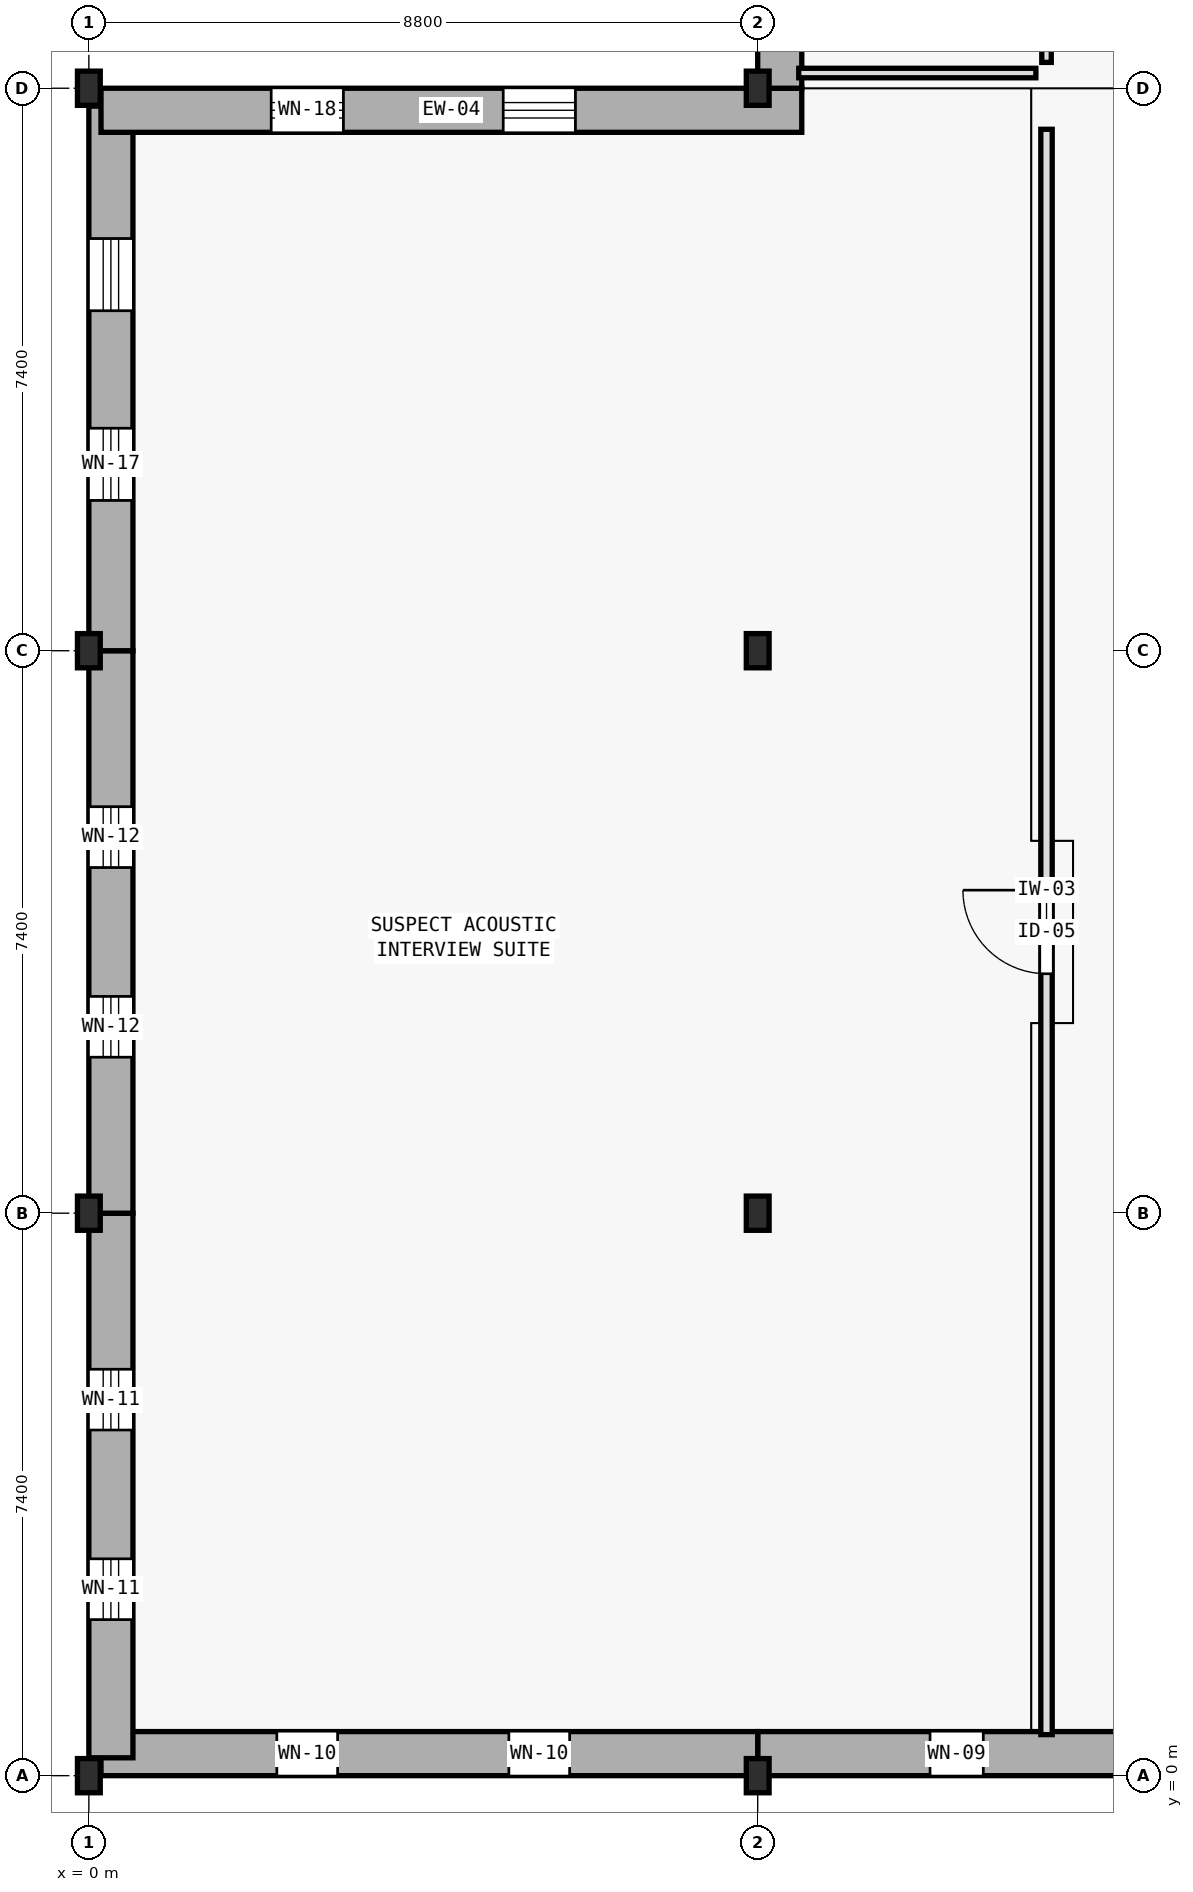
"""IFC4 building model, lengths in metres.
Left out: names, types, materials, properties, quantities, classifications, styles, units other than length and angle.
Written with IfcOpenShell. Run it as: python <this file> out.ifc"""

import sys

from ifc_helpers import new_model, si_unit, direction, frame, frame_2d, origin, origin_2d, place, context, subcontext, project, spatial, rectangle, i_section, extrude, element, fill, save


model = new_model("IFC4")
c1 = context("Model", 3, precision=1e-05, world=origin(), true_north=direction((0.0, 1.0)))
c2 = subcontext(c1, "Body", "Model", "MODEL_VIEW")
j1 = project(units=[si_unit("LENGTHUNIT", "METRE"), si_unit("PLANEANGLEUNIT", "RADIAN")], contexts=[c1])
p1 = place(None, origin())
s1 = spatial("IfcSite", under=j1, at=p1, CompositionType="ELEMENT")
p2 = place(p1, origin())
s2 = spatial("IfcBuilding", under=s1, at=p2, CompositionType="ELEMENT")
p3 = place(p2, frame((0.0, 0.0, 5.4)))
s3 = spatial("IfcBuildingStorey", under=s2, at=p3, CompositionType="ELEMENT", Elevation=5.4)
for number, where, z_axis, x_axis in (
    (1, (0.0, 0.0, 0.0), (0.0, 0.0, 1.0), (1.0, 0.0, 0.0)),
    (2, (0.0, 7.4, 0.0), (0.0, 0.0, 1.0), (1.0, 0.0, 0.0)),
    (3, (0.0, 14.8, 0.0), (0.0, 0.0, 1.0), (1.0, 0.0, 0.0)),
    (4, (0.0, 22.2, 0.0), (0.0, 0.0, 1.0), (1.0, 0.0, 0.0)),
    (5, (8.8, 0.0, 0.0), (0.0, 0.0, 1.0), (1.0, 0.0, 0.0)),
    (6, (8.8, 7.4, 0.0), (0.0, 0.0, 1.0), (1.0, 0.0, 0.0)),
    (7, (8.8, 14.8, 0.0), (0.0, 0.0, 1.0), (1.0, 0.0, 0.0)),
    (8, (8.8, 22.2, 0.0), (0.0, 0.0, 1.0), (1.0, 0.0, 0.0)),
):
    element("IfcColumn", number, at=place(p3, frame(where, z_axis=z_axis, x_axis=x_axis)), inside=s3, PredefinedType="COLUMN", context=c2, shape_type="SweptSolid", body=[
        extrude(i_section(OverallWidth=0.3, OverallDepth=0.45, WebThickness=0.014, FlangeThickness=0.026, FilletRadius=0.027, at=origin_2d()), origin(), (0.0, 0.0, 1.0), 4.5),
    ])
p4 = place(p3, frame((16.8, 0.29, 0.0), z_axis=(0.0, 0.0, 1.0), x_axis=(-1.0, 0.0, 0.0)))
e9 = element("IfcWall", 9, at=p4, inside=s3, PredefinedType="STANDARD", context=c2, shape_type="SweptSolid", body=[
    extrude(rectangle(XDim=8.0, YDim=0.58, at=frame_2d((4.0, 0.0))), origin(), (0.0, 0.0, 1.0), 4.5),
])
p5 = place(p4, frame((2.268, 0.0, 0.9)))
e10 = element("IfcOpeningElement", 10, at=p5, cuts=e9, PredefinedType="OPENING", context=c2, shape_type="SweptSolid", body=[
    extrude(rectangle(XDim=0.7, YDim=2.4, at=frame_2d((0.35, 1.2))), frame((0.0, 0.3, 0.0), z_axis=(0.0, -1.0, 0.0), x_axis=(1.0, 0.0, 0.0)), (0.0, 0.0, 1.0), 0.6),
])
p6 = place(p4, frame((5.032, 0.0, 0.9)))
e11 = element("IfcOpeningElement", 11, at=p6, cuts=e9, PredefinedType="OPENING", context=c2, shape_type="SweptSolid", body=[
    extrude(rectangle(XDim=0.7, YDim=2.4, at=frame_2d((0.35, 1.2))), frame((0.0, 0.3, 0.0), z_axis=(0.0, -1.0, 0.0), x_axis=(1.0, 0.0, 0.0)), (0.0, 0.0, 1.0), 0.6),
])
p7 = place(p3, frame((8.8, 0.29, 0.0), z_axis=(0.0, 0.0, 1.0), x_axis=(-1.0, 0.0, 0.0)))
e12 = element("IfcWall", 12, at=p7, inside=s3, PredefinedType="STANDARD", context=c2, shape_type="SweptSolid", body=[
    extrude(rectangle(XDim=8.64, YDim=0.58, at=frame_2d((4.32, 0.0))), origin(), (0.0, 0.0, 1.0), 4.22),
])
p8 = place(p7, frame((2.474, 0.0, 1.35)))
e13 = element("IfcOpeningElement", 13, at=p8, cuts=e12, PredefinedType="OPENING", context=c2, shape_type="SweptSolid", body=[
    extrude(rectangle(XDim=0.8, YDim=1.55, at=frame_2d((0.4, 0.775))), frame((0.0, 0.3, 0.0), z_axis=(0.0, -1.0, 0.0), x_axis=(1.0, 0.0, 0.0)), (0.0, 0.0, 1.0), 0.6),
])
p9 = place(p7, frame((5.526, 0.0, 1.35)))
e14 = element("IfcOpeningElement", 14, at=p9, cuts=e12, PredefinedType="OPENING", context=c2, shape_type="SweptSolid", body=[
    extrude(rectangle(XDim=0.8, YDim=1.55, at=frame_2d((0.4, 0.775))), frame((0.0, 0.3, 0.0), z_axis=(0.0, -1.0, 0.0), x_axis=(1.0, 0.0, 0.0)), (0.0, 0.0, 1.0), 0.6),
])
p10 = place(p3, frame((0.29, 0.235, 0.0), z_axis=(0.0, 0.0, 1.0), x_axis=(0.0, 1.0, 0.0)))
e15 = element("IfcWall", 15, at=p10, inside=s3, PredefinedType="STANDARD", context=c2, shape_type="SweptSolid", body=[
    extrude(rectangle(XDim=7.165, YDim=0.58, at=frame_2d((3.583, 0.0))), origin(), (0.0, 0.0, 1.0), 4.22),
])
p11 = place(p10, frame((1.818, 0.0, 0.9)))
e16 = element("IfcOpeningElement", 16, at=p11, cuts=e15, PredefinedType="OPENING", context=c2, shape_type="SweptSolid", body=[
    extrude(rectangle(XDim=0.8, YDim=1.95, at=frame_2d((0.4, 0.975))), frame((0.0, 0.3, 0.0), z_axis=(0.0, -1.0, 0.0), x_axis=(1.0, 0.0, 0.0)), (0.0, 0.0, 1.0), 0.6),
])
p12 = place(p10, frame((4.312, 0.0, 0.9)))
e17 = element("IfcOpeningElement", 17, at=p12, cuts=e15, PredefinedType="OPENING", context=c2, shape_type="SweptSolid", body=[
    extrude(rectangle(XDim=0.8, YDim=1.95, at=frame_2d((0.4, 0.975))), frame((0.0, 0.3, 0.0), z_axis=(0.0, -1.0, 0.0), x_axis=(1.0, 0.0, 0.0)), (0.0, 0.0, 1.0), 0.6),
])
p13 = place(p3, frame((0.29, 7.4, 0.0), z_axis=(0.0, 0.0, 1.0), x_axis=(0.0, 1.0, 0.0)))
e18 = element("IfcWall", 18, at=p13, inside=s3, PredefinedType="STANDARD", context=c2, shape_type="SweptSolid", body=[
    extrude(rectangle(XDim=7.4, YDim=0.58, at=frame_2d((3.7, 0.0))), origin(), (0.0, 0.0, 1.0), 4.22),
])
p14 = place(p13, frame((2.052, 0.0, 0.9)))
e19 = element("IfcOpeningElement", 19, at=p14, cuts=e18, PredefinedType="OPENING", context=c2, shape_type="SweptSolid", body=[
    extrude(rectangle(XDim=0.8, YDim=2.35, at=frame_2d((0.4, 1.175))), frame((0.0, 0.3, 0.0), z_axis=(0.0, -1.0, 0.0), x_axis=(1.0, 0.0, 0.0)), (0.0, 0.0, 1.0), 0.6),
])
p15 = place(p13, frame((4.547, 0.0, 0.9)))
e20 = element("IfcOpeningElement", 20, at=p15, cuts=e18, PredefinedType="OPENING", context=c2, shape_type="SweptSolid", body=[
    extrude(rectangle(XDim=0.8, YDim=2.35, at=frame_2d((0.4, 1.175))), frame((0.0, 0.3, 0.0), z_axis=(0.0, -1.0, 0.0), x_axis=(1.0, 0.0, 0.0)), (0.0, 0.0, 1.0), 0.6),
])
p16 = place(p3, frame((0.29, 14.8, 0.0), z_axis=(0.0, 0.0, 1.0), x_axis=(0.0, 1.0, 0.0)))
e21 = element("IfcWall", 21, at=p16, inside=s3, PredefinedType="STANDARD", context=c2, shape_type="SweptSolid", body=[
    extrude(rectangle(XDim=7.165, YDim=0.58, at=frame_2d((3.583, 0.0))), origin(), (0.0, 0.0, 1.0), 4.22),
])
p17 = place(p16, frame((1.978, 0.0, 0.9)))
e22 = element("IfcOpeningElement", 22, at=p17, cuts=e21, PredefinedType="OPENING", context=c2, shape_type="SweptSolid", body=[
    extrude(rectangle(XDim=0.95, YDim=1.8, at=frame_2d((0.475, 0.9))), frame((0.0, 0.3, 0.0), z_axis=(0.0, -1.0, 0.0), x_axis=(1.0, 0.0, 0.0)), (0.0, 0.0, 1.0), 0.6),
])
p18 = place(p16, frame((4.472, 0.0, 0.9)))
e23 = element("IfcOpeningElement", 23, at=p18, cuts=e21, PredefinedType="OPENING", context=c2, shape_type="SweptSolid", body=[
    extrude(rectangle(XDim=0.95, YDim=1.8, at=frame_2d((0.475, 0.9))), frame((0.0, 0.3, 0.0), z_axis=(0.0, -1.0, 0.0), x_axis=(1.0, 0.0, 0.0)), (0.0, 0.0, 1.0), 0.6),
])
p19 = place(p3, frame((0.16, 21.91, 0.0), z_axis=(0.0, 0.0, 1.0), x_axis=(1.0, 0.0, 0.0)))
e24 = element("IfcWall", 24, at=p19, inside=s3, PredefinedType="STANDARD", context=c2, shape_type="SweptSolid", body=[
    extrude(rectangle(XDim=9.22, YDim=0.58, at=frame_2d((4.61, 0.0))), origin(), (0.0, 0.0, 1.0), 4.22),
])
p20 = place(p19, frame((2.239, 0.0, 0.9)))
e25 = element("IfcOpeningElement", 25, at=p20, cuts=e24, PredefinedType="OPENING", context=c2, shape_type="SweptSolid", body=[
    extrude(rectangle(XDim=0.95, YDim=2.2, at=frame_2d((0.475, 1.1))), frame((0.0, 0.3, 0.0), z_axis=(0.0, -1.0, 0.0), x_axis=(1.0, 0.0, 0.0)), (0.0, 0.0, 1.0), 0.6),
])
p21 = place(p19, frame((5.292, 0.0, 0.9)))
e26 = element("IfcOpeningElement", 26, at=p21, cuts=e24, PredefinedType="OPENING", context=c2, shape_type="SweptSolid", body=[
    extrude(rectangle(XDim=0.95, YDim=2.2, at=frame_2d((0.475, 1.1))), frame((0.0, 0.3, 0.0), z_axis=(0.0, -1.0, 0.0), x_axis=(1.0, 0.0, 0.0)), (0.0, 0.0, 1.0), 0.6),
])
p22 = place(p3, frame((9.09, 22.2, 0.0), z_axis=(0.0, 0.0, 1.0), x_axis=(0.0, 1.0, 0.0)))
e27 = element("IfcWall", 27, at=p22, inside=s3, PredefinedType="STANDARD", context=c2, shape_type="SweptSolid", body=[
    extrude(rectangle(XDim=7.4, YDim=0.58, at=frame_2d((3.7, 0.0))), origin(), (0.0, 0.0, 1.0), 4.22),
])
p23 = place(p22, frame((1.878, 0.0, 1.35)))
e28 = element("IfcOpeningElement", 28, at=p23, cuts=e27, PredefinedType="OPENING", context=c2, shape_type="SweptSolid", body=[
    extrude(rectangle(XDim=1.15, YDim=1.5, at=frame_2d((0.575, 0.75))), frame((0.0, 0.3, 0.0), z_axis=(0.0, -1.0, 0.0), x_axis=(1.0, 0.0, 0.0)), (0.0, 0.0, 1.0), 0.6),
])
p24 = place(p22, frame((4.372, 0.0, 1.35)))
e29 = element("IfcOpeningElement", 29, at=p24, cuts=e27, PredefinedType="OPENING", context=c2, shape_type="SweptSolid", body=[
    extrude(rectangle(XDim=1.15, YDim=1.5, at=frame_2d((0.575, 0.75))), frame((0.0, 0.3, 0.0), z_axis=(0.0, -1.0, 0.0), x_axis=(1.0, 0.0, 0.0)), (0.0, 0.0, 1.0), 0.6),
])
p25 = place(p3, frame((12.6, 0.54, 0.0), z_axis=(0.0, 0.0, 1.0), x_axis=(0.0, 1.0, 0.0)))
e30 = element("IfcWall", 30, at=p25, inside=s3, PredefinedType="PARTITIONING", context=c2, shape_type="SweptSolid", body=[
    extrude(rectangle(XDim=21.12, YDim=0.15, at=frame_2d((10.56, 0.0))), origin(), (0.0, 0.0, 1.0), 3.65),
])
p26 = place(p25, frame((10.01, 0.0, 0.0)))
e31 = element("IfcOpeningElement", 31, at=p26, cuts=e30, PredefinedType="OPENING", context=c2, shape_type="SweptSolid", body=[
    extrude(rectangle(XDim=1.1, YDim=2.2, at=frame_2d((0.55, 1.1))), frame((0.0, 0.085, 0.0), z_axis=(0.0, -1.0, 0.0), x_axis=(1.0, 0.0, 0.0)), (0.0, 0.0, 1.0), 0.17),
])
p27 = place(p3, frame((9.34, 22.4, 0.0), z_axis=(0.0, 0.0, 1.0), x_axis=(1.0, 0.0, 0.0)))
e32 = element("IfcWall", 32, at=p27, inside=s3, PredefinedType="PARTITIONING", context=c2, shape_type="SweptSolid", body=[
    extrude(rectangle(XDim=3.12, YDim=0.125, at=frame_2d((1.56, 0.0))), origin(), (0.0, 0.0, 1.0), 3.84),
])
p28 = place(p3, frame((12.6, 22.54, 0.0), z_axis=(0.0, 0.0, 1.0), x_axis=(0.0, 1.0, 0.0)))
e33 = element("IfcWall", 33, at=p28, inside=s3, PredefinedType="PARTITIONING", context=c2, shape_type="SweptSolid", body=[
    extrude(rectangle(XDim=13.92, YDim=0.125, at=frame_2d((6.96, 0.0))), origin(), (0.0, 0.0, 1.0), 3.65),
])
p29 = place(p28, frame((6.46, 0.0, 0.0)))
e34 = element("IfcOpeningElement", 34, at=p29, cuts=e33, PredefinedType="OPENING", context=c2, shape_type="SweptSolid", body=[
    extrude(rectangle(XDim=1.0, YDim=2.2, at=frame_2d((0.5, 1.1))), frame((0.0, 0.073, 0.0), z_axis=(0.0, -1.0, 0.0), x_axis=(1.0, 0.0, 0.0)), (0.0, 0.0, 1.0), 0.145),
])
p30 = place(p6, origin())
e35 = element("IfcWindow", 35, at=p30, inside=s3, PartitioningType="SINGLE_PANEL", PredefinedType="WINDOW", context=c2, shape_type="SweptSolid", body=[
    extrude(rectangle(XDim=0.7, YDim=2.4, at=frame_2d((0.35, 1.2))), frame((0.0, 0.03, 0.0), z_axis=(0.0, -1.0, 0.0), x_axis=(1.0, 0.0, 0.0)), (0.0, 0.0, 1.0), 0.06),
])
fill(e11, e35)
p31 = place(p8, origin())
e36 = element("IfcWindow", 36, at=p31, inside=s3, PartitioningType="SINGLE_PANEL", PredefinedType="WINDOW", context=c2, shape_type="SweptSolid", body=[
    extrude(rectangle(XDim=0.8, YDim=1.55, at=frame_2d((0.4, 0.775))), frame((0.0, 0.03, 0.0), z_axis=(0.0, -1.0, 0.0), x_axis=(1.0, 0.0, 0.0)), (0.0, 0.0, 1.0), 0.06),
])
fill(e13, e36)
p32 = place(p9, origin())
e37 = element("IfcWindow", 37, at=p32, inside=s3, PartitioningType="SINGLE_PANEL", PredefinedType="WINDOW", context=c2, shape_type="SweptSolid", body=[
    extrude(rectangle(XDim=0.8, YDim=1.55, at=frame_2d((0.4, 0.775))), frame((0.0, 0.03, 0.0), z_axis=(0.0, -1.0, 0.0), x_axis=(1.0, 0.0, 0.0)), (0.0, 0.0, 1.0), 0.06),
])
fill(e14, e37)
p33 = place(p11, origin())
e38 = element("IfcWindow", 38, at=p33, inside=s3, PartitioningType="SINGLE_PANEL", PredefinedType="WINDOW", context=c2, shape_type="SweptSolid", body=[
    extrude(rectangle(XDim=0.8, YDim=1.95, at=frame_2d((0.4, 0.975))), frame((0.0, 0.03, 0.0), z_axis=(0.0, -1.0, 0.0), x_axis=(1.0, 0.0, 0.0)), (0.0, 0.0, 1.0), 0.06),
])
fill(e16, e38)
p34 = place(p12, origin())
e39 = element("IfcWindow", 39, at=p34, inside=s3, PartitioningType="SINGLE_PANEL", PredefinedType="WINDOW", context=c2, shape_type="SweptSolid", body=[
    extrude(rectangle(XDim=0.8, YDim=1.95, at=frame_2d((0.4, 0.975))), frame((0.0, 0.03, 0.0), z_axis=(0.0, -1.0, 0.0), x_axis=(1.0, 0.0, 0.0)), (0.0, 0.0, 1.0), 0.06),
])
fill(e17, e39)
p35 = place(p14, origin())
e40 = element("IfcWindow", 40, at=p35, inside=s3, PartitioningType="SINGLE_PANEL", PredefinedType="WINDOW", context=c2, shape_type="SweptSolid", body=[
    extrude(rectangle(XDim=0.8, YDim=2.35, at=frame_2d((0.4, 1.175))), frame((0.0, 0.03, 0.0), z_axis=(0.0, -1.0, 0.0), x_axis=(1.0, 0.0, 0.0)), (0.0, 0.0, 1.0), 0.06),
])
fill(e19, e40)
p36 = place(p15, origin())
e41 = element("IfcWindow", 41, at=p36, inside=s3, PartitioningType="SINGLE_PANEL", PredefinedType="WINDOW", context=c2, shape_type="SweptSolid", body=[
    extrude(rectangle(XDim=0.8, YDim=2.35, at=frame_2d((0.4, 1.175))), frame((0.0, 0.03, 0.0), z_axis=(0.0, -1.0, 0.0), x_axis=(1.0, 0.0, 0.0)), (0.0, 0.0, 1.0), 0.06),
])
fill(e20, e41)
p37 = place(p17, origin())
e42 = element("IfcWindow", 42, at=p37, inside=s3, PartitioningType="SINGLE_PANEL", PredefinedType="WINDOW", context=c2, shape_type="SweptSolid", body=[
    extrude(rectangle(XDim=0.95, YDim=1.8, at=frame_2d((0.475, 0.9))), frame((0.0, 0.03, 0.0), z_axis=(0.0, -1.0, 0.0), x_axis=(1.0, 0.0, 0.0)), (0.0, 0.0, 1.0), 0.06),
])
fill(e22, e42)
p38 = place(p18, origin())
e43 = element("IfcWindow", 43, at=p38, inside=s3, PartitioningType="SINGLE_PANEL", PredefinedType="WINDOW", context=c2, shape_type="SweptSolid", body=[
    extrude(rectangle(XDim=0.95, YDim=1.8, at=frame_2d((0.475, 0.9))), frame((0.0, 0.03, 0.0), z_axis=(0.0, -1.0, 0.0), x_axis=(1.0, 0.0, 0.0)), (0.0, 0.0, 1.0), 0.06),
])
fill(e23, e43)
p39 = place(p20, origin())
e44 = element("IfcWindow", 44, at=p39, inside=s3, PartitioningType="SINGLE_PANEL", PredefinedType="WINDOW", context=c2, shape_type="SweptSolid", body=[
    extrude(rectangle(XDim=0.95, YDim=2.2, at=frame_2d((0.475, 1.1))), frame((0.0, 0.03, 0.0), z_axis=(0.0, -1.0, 0.0), x_axis=(1.0, 0.0, 0.0)), (0.0, 0.0, 1.0), 0.06),
])
fill(e25, e44)
p40 = place(p21, origin())
e45 = element("IfcWindow", 45, at=p40, inside=s3, PartitioningType="SINGLE_PANEL", PredefinedType="WINDOW", context=c2, shape_type="SweptSolid", body=[
    extrude(rectangle(XDim=0.95, YDim=2.2, at=frame_2d((0.475, 1.1))), frame((0.0, 0.03, 0.0), z_axis=(0.0, -1.0, 0.0), x_axis=(1.0, 0.0, 0.0)), (0.0, 0.0, 1.0), 0.06),
])
fill(e26, e45)
p41 = place(p26, origin())
e46 = element("IfcDoor", 46, at=p41, inside=s3, OperationType="SINGLE_SWING_RIGHT", PredefinedType="DOOR", context=c2, shape_type="SweptSolid", body=[
    extrude(rectangle(XDim=1.1, YDim=2.2, at=frame_2d((0.55, 1.1))), frame((0.0, 0.025, 0.0), z_axis=(0.0, -1.0, 0.0), x_axis=(1.0, 0.0, 0.0)), (0.0, 0.0, 1.0), 0.05),
])
fill(e31, e46)
save(model, sys.argv[1])
